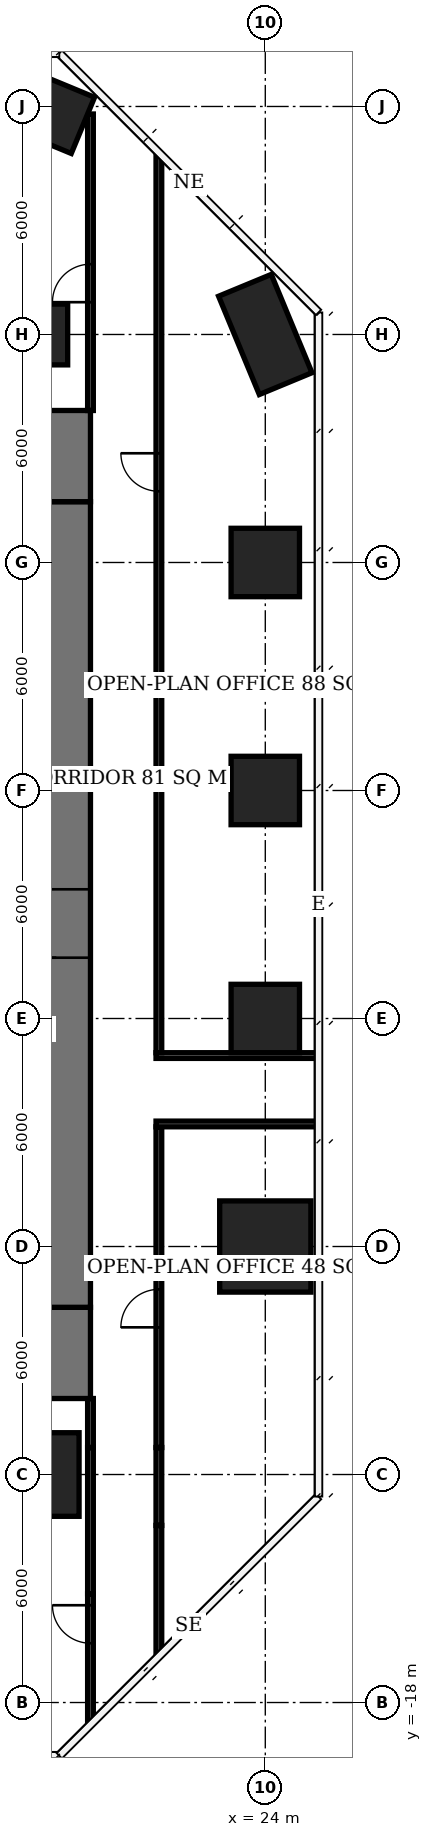
"""IFC4 building model, lengths in metres.
Left out: names, types, materials, properties, quantities, classifications, styles, units other than length and angle.
Written with IfcOpenShell. Run it as: python <this file> out.ifc"""

import sys

from ifc_helpers import new_model, si_unit, direction, frame, frame_2d, origin, origin_2d, place, context, subcontext, project, spatial, rectangle, extrude, element, fill, save


model = new_model("IFC4")
c1 = context("Model", 3, precision=1e-05, world=origin(), true_north=direction((0.0, 1.0)))
c2 = subcontext(c1, "Body", "Model", "MODEL_VIEW")
j1 = project(units=[si_unit("LENGTHUNIT", "METRE"), si_unit("PLANEANGLEUNIT", "RADIAN")], contexts=[c1])
p1 = place(None, origin())
s1 = spatial("IfcSite", under=j1, at=p1, CompositionType="ELEMENT")
p2 = place(p1, origin())
s2 = spatial("IfcBuilding", under=s1, at=p2, CompositionType="ELEMENT")
p3 = place(p2, frame((0.0, 0.0, 125.0)))
s3 = spatial("IfcBuildingStorey", under=s2, at=p3, CompositionType="ELEMENT", Elevation=125.0)
p4 = place(p3, frame((18.0, -12.0, 0.0), z_axis=(0.0, 0.0, 1.0), x_axis=(1.0, 0.0, 0.0)))
e1 = element("IfcColumn", 1, at=p4, inside=s3, PredefinedType="COLUMN", context=c2, shape_type="SweptSolid", body=[
    extrude(rectangle(XDim=2.2, YDim=2.2, at=origin_2d()), origin(), (0.0, 0.0, 1.0), 3.9),
])
p5 = place(p3, frame((18.0, 18.0, 0.0), z_axis=(0.0, 0.0, 1.0), x_axis=(1.0, 0.0, 0.0)))
e2 = element("IfcColumn", 2, at=p5, inside=s3, PredefinedType="COLUMN", context=c2, shape_type="SweptSolid", body=[
    extrude(rectangle(XDim=1.6, YDim=1.6, at=origin_2d()), origin(), (0.0, 0.0, 1.0), 3.9),
])
p6 = place(p3, frame((18.0, 24.0, 0.0), z_axis=(0.0, 0.0, 1.0), x_axis=(0.923879532511, -0.382683432365, 0.0)))
e3 = element("IfcColumn", 3, at=p6, inside=s3, PredefinedType="COLUMN", context=c2, shape_type="SweptSolid", body=[
    extrude(rectangle(XDim=2.6, YDim=1.6, at=origin_2d()), origin(), (0.0, 0.0, 1.0), 3.9),
])
p7 = place(p3, frame((24.0, -6.0, 0.0), z_axis=(0.0, 0.0, 1.0), x_axis=(1.0, 0.0, 0.0)))
e4 = element("IfcColumn", 4, at=p7, inside=s3, PredefinedType="COLUMN", context=c2, shape_type="SweptSolid", body=[
    extrude(rectangle(XDim=2.4, YDim=2.4, at=origin_2d()), origin(), (0.0, 0.0, 1.0), 3.9),
])
for number, where, z_axis, x_axis in (
    (5, (24.0, 0.0, 0.0), (0.0, 0.0, 1.0), (1.0, 0.0, 0.0)),
    (6, (24.0, 6.0, 0.0), (0.0, 0.0, 1.0), (1.0, 0.0, 0.0)),
    (7, (24.0, 12.0, 0.0), (0.0, 0.0, 1.0), (1.0, 0.0, 0.0)),
):
    element("IfcColumn", number, at=place(p3, frame(where, z_axis=z_axis, x_axis=x_axis)), inside=s3, PredefinedType="COLUMN", context=c2, shape_type="SweptSolid", body=[
        extrude(rectangle(XDim=1.8, YDim=1.8, at=origin_2d()), origin(), (0.0, 0.0, 1.0), 3.9),
    ])
p8 = place(p3, frame((24.0, 18.0, 0.0), z_axis=(0.0, 0.0, 1.0), x_axis=(0.382683432365, -0.923879532511, 0.0)))
e8 = element("IfcColumn", 8, at=p8, inside=s3, PredefinedType="COLUMN", context=c2, shape_type="SweptSolid", body=[
    extrude(rectangle(XDim=2.8, YDim=1.5, at=origin_2d()), origin(), (0.0, 0.0, 1.0), 3.9),
])
p9 = place(p3, frame((18.5, -7.6, 0.0), z_axis=(0.0, 0.0, 1.0), x_axis=(0.0, 1.0, 0.0)))
e9 = element("IfcWall", 9, at=p9, inside=s3, PredefinedType="SHEAR", context=c2, shape_type="SweptSolid", body=[
    extrude(rectangle(XDim=21.2, YDim=1.8, at=frame_2d((10.6, 0.0))), origin(), (0.0, 0.0, 1.0), 3.9),
])
p10 = place(p9, frame((9.2, 0.0, 0.0)))
e10 = element("IfcOpeningElement", 10, at=p10, cuts=e9, PredefinedType="OPENING", context=c2, shape_type="SweptSolid", body=[
    extrude(rectangle(XDim=1.8, YDim=2.4, at=frame_2d((0.9, 1.2))), frame((0.0, 0.91, 0.0), z_axis=(0.0, -1.0, 0.0), x_axis=(1.0, 0.0, 0.0)), (0.0, 0.0, 1.0), 1.82),
])
for number, where, z_axis, x_axis in (
    (11, (18.5, -10.0, 0.0), (0.0, 0.0, 1.0), (0.0, 1.0, 0.0)),
    (12, (18.5, 13.6, 0.0), (0.0, 0.0, 1.0), (0.0, 1.0, 0.0)),
):
    element("IfcWall", number, at=place(p3, frame(where, z_axis=z_axis, x_axis=x_axis)), inside=s3, PredefinedType="SHEAR", context=c2, shape_type="SweptSolid", body=[
        extrude(rectangle(XDim=2.4, YDim=1.8, at=frame_2d((1.2, 0.0))), origin(), (0.0, 0.0, 1.0), 3.9),
    ])
p11 = place(p3, frame((19.4, -18.489, 0.0), z_axis=(0.0, 0.0, 1.0), x_axis=(0.0, 1.0, 0.0)))
e13 = element("IfcWall", 13, at=p11, inside=s3, PredefinedType="PARTITIONING", context=c2, shape_type="SweptSolid", body=[
    extrude(rectangle(XDim=3.349, YDim=0.15, at=frame_2d((1.675, 0.0))), origin(), (0.0, 0.0, 1.0), 3.65),
])
p12 = place(p11, frame((2.049, 0.0, 0.0)))
e14 = element("IfcOpeningElement", 14, at=p12, cuts=e13, PredefinedType="OPENING", context=c2, shape_type="SweptSolid", body=[
    extrude(rectangle(XDim=1.0, YDim=2.1, at=frame_2d((0.5, 1.05))), frame((0.0, 0.085, 0.0), z_axis=(0.0, -1.0, 0.0), x_axis=(1.0, 0.0, 0.0)), (0.0, 0.0, 1.0), 0.17),
])
p13 = place(p3, frame((19.4, -15.14, 0.0), z_axis=(0.0, 0.0, 1.0), x_axis=(0.0, 1.0, 0.0)))
e15 = element("IfcWall", 15, at=p13, inside=s3, PredefinedType="PARTITIONING", context=c2, shape_type="SweptSolid", body=[
    extrude(rectangle(XDim=3.85, YDim=0.15, at=frame_2d((1.925, 0.0))), origin(), (0.0, 0.0, 1.0), 2.65),
])
p14 = place(p3, frame((19.4, -11.29, 0.0), z_axis=(0.0, 0.0, 1.0), x_axis=(0.0, 1.0, 0.0)))
e16 = element("IfcWall", 16, at=p14, inside=s3, PredefinedType="PARTITIONING", context=c2, shape_type="SweptSolid", body=[
    extrude(rectangle(XDim=1.29, YDim=0.15, at=frame_2d((0.645, 0.0))), origin(), (0.0, 0.0, 1.0), 3.65),
])
p15 = place(p3, frame((19.4, 16.0, 0.0), z_axis=(0.0, 0.0, 1.0), x_axis=(0.0, 1.0, 0.0)))
e17 = element("IfcWall", 17, at=p15, inside=s3, PredefinedType="PARTITIONING", context=c2, shape_type="SweptSolid", body=[
    extrude(rectangle(XDim=7.802, YDim=0.15, at=frame_2d((3.901, 0.0))), origin(), (0.0, 0.0, 1.0), 3.65),
])
p16 = place(p15, frame((2.85, 0.0, 0.0)))
e18 = element("IfcOpeningElement", 18, at=p16, cuts=e17, PredefinedType="OPENING", context=c2, shape_type="SweptSolid", body=[
    extrude(rectangle(XDim=1.0, YDim=2.1, at=frame_2d((0.5, 1.05))), frame((0.0, 0.085, 0.0), z_axis=(0.0, -1.0, 0.0), x_axis=(1.0, 0.0, 0.0)), (0.0, 0.0, 1.0), 0.17),
])
p17 = place(p3, frame((21.2, -16.689, 0.0), z_axis=(0.0, 0.0, 1.0), x_axis=(0.0, 1.0, 0.0)))
e19 = element("IfcWall", 19, at=p17, inside=s3, PredefinedType="PARTITIONING", context=c2, shape_type="SweptSolid", body=[
    extrude(rectangle(XDim=3.349, YDim=0.15, at=frame_2d((1.674, 0.0))), origin(), (0.0, 0.0, 1.0), 3.65),
])
p18 = place(p3, frame((21.2, -13.34, 0.0), z_axis=(0.0, 0.0, 1.0), x_axis=(0.0, 1.0, 0.0)))
e20 = element("IfcWall", 20, at=p18, inside=s3, PredefinedType="PARTITIONING", context=c2, shape_type="SweptSolid", body=[
    extrude(rectangle(XDim=2.05, YDim=0.15, at=frame_2d((1.025, 0.0))), origin(), (0.0, 0.0, 1.0), 2.65),
])
p19 = place(p3, frame((21.2, -11.29, 0.0), z_axis=(0.0, 0.0, 1.0), x_axis=(0.0, 1.0, 0.0)))
e21 = element("IfcWall", 21, at=p19, inside=s3, PredefinedType="PARTITIONING", context=c2, shape_type="SweptSolid", body=[
    extrude(rectangle(XDim=8.44, YDim=0.15, at=frame_2d((4.22, 0.0))), origin(), (0.0, 0.0, 1.0), 3.65),
])
p20 = place(p19, frame((3.163, 0.0, 0.0)))
e22 = element("IfcOpeningElement", 22, at=p20, cuts=e21, PredefinedType="OPENING", context=c2, shape_type="SweptSolid", body=[
    extrude(rectangle(XDim=1.0, YDim=2.1, at=frame_2d((0.5, 1.05))), frame((0.0, 0.085, 0.0), z_axis=(0.0, -1.0, 0.0), x_axis=(1.0, 0.0, 0.0)), (0.0, 0.0, 1.0), 0.17),
])
p21 = place(p3, frame((21.125, -2.775, 0.0), z_axis=(0.0, 0.0, 1.0), x_axis=(1.0, 0.0, 0.0)))
e23 = element("IfcWall", 23, at=p21, inside=s3, PredefinedType="PARTITIONING", context=c2, shape_type="SweptSolid", body=[
    extrude(rectangle(XDim=4.275, YDim=0.15, at=frame_2d((2.137, 0.0))), origin(), (0.0, 0.0, 1.0), 3.65),
])
p22 = place(p3, frame((21.2, -0.9, 0.0), z_axis=(0.0, 0.0, 1.0), x_axis=(0.0, 1.0, 0.0)))
e24 = element("IfcWall", 24, at=p22, inside=s3, PredefinedType="PARTITIONING", context=c2, shape_type="SweptSolid", body=[
    extrude(rectangle(XDim=23.589, YDim=0.15, at=frame_2d((11.794, 0.0))), origin(), (0.0, 0.0, 1.0), 3.65),
])
p23 = place(p22, frame((14.774, 0.0, 0.0)))
e25 = element("IfcOpeningElement", 25, at=p23, cuts=e24, PredefinedType="OPENING", context=c2, shape_type="SweptSolid", body=[
    extrude(rectangle(XDim=1.0, YDim=2.1, at=frame_2d((0.5, 1.05))), frame((0.0, 0.085, 0.0), z_axis=(0.0, -1.0, 0.0), x_axis=(1.0, 0.0, 0.0)), (0.0, 0.0, 1.0), 0.17),
])
p24 = place(p3, frame((21.125, -0.975, 0.0), z_axis=(0.0, 0.0, 1.0), x_axis=(1.0, 0.0, 0.0)))
e26 = element("IfcWall", 26, at=p24, inside=s3, PredefinedType="PARTITIONING", context=c2, shape_type="SweptSolid", body=[
    extrude(rectangle(XDim=4.275, YDim=0.15, at=frame_2d((2.137, 0.0))), origin(), (0.0, 0.0, 1.0), 3.65),
])
p25 = place(p10, origin())
e27 = element("IfcDoor", 27, at=p25, inside=s3, OperationType="DOUBLE_DOOR_SINGLE_SWING", PredefinedType="DOOR", context=c2, shape_type="SweptSolid", body=[
    extrude(rectangle(XDim=1.8, YDim=2.4, at=frame_2d((0.9, 1.2))), frame((0.0, 0.025, 0.0), z_axis=(0.0, -1.0, 0.0), x_axis=(1.0, 0.0, 0.0)), (0.0, 0.0, 1.0), 0.05),
])
fill(e10, e27)
p26 = place(p12, origin())
e28 = element("IfcDoor", 28, at=p26, inside=s3, OperationType="SINGLE_SWING_RIGHT", PredefinedType="DOOR", context=c2, shape_type="SweptSolid", body=[
    extrude(rectangle(XDim=1.0, YDim=2.1, at=frame_2d((0.5, 1.05))), frame((0.0, 0.025, 0.0), z_axis=(0.0, -1.0, 0.0), x_axis=(1.0, 0.0, 0.0)), (0.0, 0.0, 1.0), 0.05),
])
fill(e14, e28)
p27 = place(p20, origin())
e29 = element("IfcDoor", 29, at=p27, inside=s3, OperationType="SINGLE_SWING_LEFT", PredefinedType="DOOR", context=c2, shape_type="SweptSolid", body=[
    extrude(rectangle(XDim=1.0, YDim=2.1, at=frame_2d((0.5, 1.05))), frame((0.0, 0.025, 0.0), z_axis=(0.0, -1.0, 0.0), x_axis=(1.0, 0.0, 0.0)), (0.0, 0.0, 1.0), 0.05),
])
fill(e22, e29)
p28 = place(p23, origin())
e30 = element("IfcDoor", 30, at=p28, inside=s3, OperationType="SINGLE_SWING_RIGHT", PredefinedType="DOOR", context=c2, shape_type="SweptSolid", body=[
    extrude(rectangle(XDim=1.0, YDim=2.1, at=frame_2d((0.5, 1.05))), frame((0.0, 0.025, 0.0), z_axis=(0.0, -1.0, 0.0), x_axis=(1.0, 0.0, 0.0)), (0.0, 0.0, 1.0), 0.05),
])
fill(e25, e30)
p29 = place(p16, origin())
e31 = element("IfcDoor", 31, at=p29, inside=s3, OperationType="SINGLE_SWING_LEFT", PredefinedType="DOOR", context=c2, shape_type="SweptSolid", body=[
    extrude(rectangle(XDim=1.0, YDim=2.1, at=frame_2d((0.5, 1.05))), frame((0.0, 0.025, 0.0), z_axis=(0.0, -1.0, 0.0), x_axis=(1.0, 0.0, 0.0)), (0.0, 0.0, 1.0), 0.05),
])
fill(e18, e31)
save(model, sys.argv[1])
